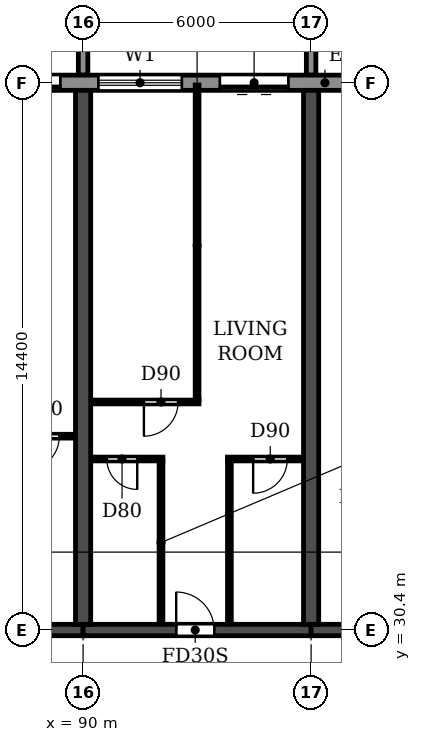
"""IFC4 building model, lengths in metres.
Left out: names, types, materials, properties, quantities, classifications, styles, units other than length and angle.
Written with IfcOpenShell. Run it as: python <this file> out.ifc"""

import sys

from ifc_helpers import new_model, si_unit, direction, frame, frame_2d, origin, place, context, subcontext, project, spatial, polyline, rectangle, outline, extrude, source, transform, mapped, element, fill, save


model = new_model("IFC4")
c1 = context("Model", 3, precision=1e-05, world=origin(), true_north=direction((0.0, 1.0)))
c2 = subcontext(c1, "Body", "Model", "MODEL_VIEW")
j1 = project(units=[si_unit("LENGTHUNIT", "METRE"), si_unit("PLANEANGLEUNIT", "RADIAN")], contexts=[c1])
p1 = place(None, origin())
s1 = spatial("IfcSite", under=j1, at=p1, CompositionType="ELEMENT")
p2 = place(p1, origin())
s2 = spatial("IfcBuilding", under=s1, at=p2, CompositionType="ELEMENT")
p3 = place(p2, frame((0.0, 0.0, 43.2)))
s3 = spatial("IfcBuildingStorey", under=s2, at=p3, CompositionType="ELEMENT", Elevation=43.2)
for number, where, z_axis, x_axis in (
    (1, (90.0, 30.55, 0.0), (0.0, 0.0, 1.0), (0.0, 1.0, 0.0)),
    (2, (96.0, 30.55, 0.0), (0.0, 0.0, 1.0), (0.0, 1.0, 0.0)),
):
    element("IfcWall", number, at=place(p3, frame(where, z_axis=z_axis, x_axis=x_axis)), inside=s3, PredefinedType="SHEAR", context=c2, shape_type="SweptSolid", body=[
        extrude(rectangle(XDim=14.05, YDim=0.4, at=frame_2d((7.025, 0.0))), origin(), (0.0, 0.0, 1.0), 3.05),
    ])
p4 = place(p3, frame((84.0, 30.4, 0.0), z_axis=(0.0, 0.0, 1.0), x_axis=(1.0, 0.0, 0.0)))
e3 = element("IfcWall", 3, at=p4, inside=s3, PredefinedType="SHEAR", context=c2, shape_type="SweptSolid", body=[
    extrude(rectangle(XDim=6.0, YDim=0.3, at=frame_2d((3.0, 0.0))), origin(), (0.0, 0.0, 1.0), 2.45),
])
p5 = place(p4, frame((2.45, 0.0, 0.0)))
e4 = element("IfcOpeningElement", 4, at=p5, cuts=e3, PredefinedType="OPENING", context=c2, shape_type="SweptSolid", body=[
    extrude(rectangle(XDim=1.0, YDim=2.1, at=frame_2d((0.5, 1.05))), frame((0.0, 0.16, 0.0), z_axis=(0.0, -1.0, 0.0), x_axis=(1.0, 0.0, 0.0)), (0.0, 0.0, 1.0), 0.32),
])
p6 = place(p3, frame((90.0, 30.4, 0.0), z_axis=(0.0, 0.0, 1.0), x_axis=(1.0, 0.0, 0.0)))
e5 = element("IfcWall", 5, at=p6, inside=s3, PredefinedType="SHEAR", context=c2, shape_type="SweptSolid", body=[
    extrude(rectangle(XDim=6.0, YDim=0.3, at=frame_2d((3.0, 0.0))), origin(), (0.0, 0.0, 1.0), 2.45),
])
p7 = place(p6, frame((2.45, 0.0, 0.0)))
e6 = element("IfcOpeningElement", 6, at=p7, cuts=e5, PredefinedType="OPENING", context=c2, shape_type="SweptSolid", body=[
    extrude(rectangle(XDim=1.0, YDim=2.1, at=frame_2d((0.5, 1.05))), frame((0.0, 0.16, 0.0), z_axis=(0.0, -1.0, 0.0), x_axis=(1.0, 0.0, 0.0)), (0.0, 0.0, 1.0), 0.32),
])
p8 = place(p3, frame((96.0, 30.4, 0.0), z_axis=(0.0, 0.0, 1.0), x_axis=(1.0, 0.0, 0.0)))
e7 = element("IfcWall", 7, at=p8, inside=s3, PredefinedType="SHEAR", context=c2, shape_type="SweptSolid", body=[
    extrude(rectangle(XDim=5.8, YDim=0.3, at=frame_2d((2.9, 0.0))), origin(), (0.0, 0.0, 1.0), 2.45),
])
p9 = place(p8, frame((2.5, 0.0, 0.0)))
e8 = element("IfcOpeningElement", 8, at=p9, cuts=e7, PredefinedType="OPENING", context=c2, shape_type="SweptSolid", body=[
    extrude(rectangle(XDim=1.0, YDim=2.1, at=frame_2d((0.5, 1.05))), frame((0.0, 0.16, 0.0), z_axis=(0.0, -1.0, 0.0), x_axis=(1.0, 0.0, 0.0)), (0.0, 0.0, 1.0), 0.32),
])
p10 = place(p3, frame((97.317, 44.8, 0.0), z_axis=(0.0, 0.0, 1.0), x_axis=(-1.0, 0.0, 0.0)))
e9 = element("IfcWall", 9, at=p10, inside=s3, PredefinedType="STANDARD", context=c2, shape_type="SweptSolid", body=[
    extrude(rectangle(XDim=92.634, YDim=0.4, at=frame_2d((46.317, 0.0))), origin(), (0.0, 0.0, 1.0), 3.05),
])
p11 = place(p10, frame((88.917, 0.0, 0.0)))
e10 = element("IfcOpeningElement", 10, at=p11, cuts=e9, PredefinedType="OPENING", context=c2, shape_type="SweptSolid", body=[
    extrude(rectangle(XDim=1.8, YDim=2.4, at=frame_2d((0.9, 1.2))), frame((0.0, 0.21, 0.0), z_axis=(0.0, -1.0, 0.0), x_axis=(1.0, 0.0, 0.0)), (0.0, 0.0, 1.0), 0.42),
])
p12 = place(p10, frame((85.717, 0.0, 0.9)))
e11 = element("IfcOpeningElement", 11, at=p12, cuts=e9, PredefinedType="OPENING", context=c2, shape_type="SweptSolid", body=[
    extrude(rectangle(XDim=2.2, YDim=1.5, at=frame_2d((1.1, 0.75))), frame((0.0, 0.21, 0.0), z_axis=(0.0, -1.0, 0.0), x_axis=(1.0, 0.0, 0.0)), (0.0, 0.0, 1.0), 0.42),
])
p13 = place(p10, frame((82.717, 0.0, 0.9)))
e12 = element("IfcOpeningElement", 12, at=p13, cuts=e9, PredefinedType="OPENING", context=c2, shape_type="SweptSolid", body=[
    extrude(rectangle(XDim=2.2, YDim=1.5, at=frame_2d((1.1, 0.75))), frame((0.0, 0.21, 0.0), z_axis=(0.0, -1.0, 0.0), x_axis=(1.0, 0.0, 0.0)), (0.0, 0.0, 1.0), 0.42),
])
p14 = place(p10, frame((79.717, 0.0, 0.9)))
e13 = element("IfcOpeningElement", 13, at=p14, cuts=e9, PredefinedType="OPENING", context=c2, shape_type="SweptSolid", body=[
    extrude(rectangle(XDim=2.2, YDim=1.5, at=frame_2d((1.1, 0.75))), frame((0.0, 0.21, 0.0), z_axis=(0.0, -1.0, 0.0), x_axis=(1.0, 0.0, 0.0)), (0.0, 0.0, 1.0), 0.42),
])
p15 = place(p10, frame((76.717, 0.0, 0.9)))
e14 = element("IfcOpeningElement", 14, at=p15, cuts=e9, PredefinedType="OPENING", context=c2, shape_type="SweptSolid", body=[
    extrude(rectangle(XDim=2.2, YDim=1.5, at=frame_2d((1.1, 0.75))), frame((0.0, 0.21, 0.0), z_axis=(0.0, -1.0, 0.0), x_axis=(1.0, 0.0, 0.0)), (0.0, 0.0, 1.0), 0.42),
])
p16 = place(p10, frame((73.917, 0.0, 0.0)))
e15 = element("IfcOpeningElement", 15, at=p16, cuts=e9, PredefinedType="OPENING", context=c2, shape_type="SweptSolid", body=[
    extrude(rectangle(XDim=1.8, YDim=2.4, at=frame_2d((0.9, 1.2))), frame((0.0, 0.21, 0.0), z_axis=(0.0, -1.0, 0.0), x_axis=(1.0, 0.0, 0.0)), (0.0, 0.0, 1.0), 0.42),
])
p17 = place(p10, frame((70.717, 0.0, 0.9)))
e16 = element("IfcOpeningElement", 16, at=p17, cuts=e9, PredefinedType="OPENING", context=c2, shape_type="SweptSolid", body=[
    extrude(rectangle(XDim=2.2, YDim=1.5, at=frame_2d((1.1, 0.75))), frame((0.0, 0.21, 0.0), z_axis=(0.0, -1.0, 0.0), x_axis=(1.0, 0.0, 0.0)), (0.0, 0.0, 1.0), 0.42),
])
p18 = place(p10, frame((67.717, 0.0, 0.9)))
e17 = element("IfcOpeningElement", 17, at=p18, cuts=e9, PredefinedType="OPENING", context=c2, shape_type="SweptSolid", body=[
    extrude(rectangle(XDim=2.2, YDim=1.5, at=frame_2d((1.1, 0.75))), frame((0.0, 0.21, 0.0), z_axis=(0.0, -1.0, 0.0), x_axis=(1.0, 0.0, 0.0)), (0.0, 0.0, 1.0), 0.42),
])
p19 = place(p10, frame((64.717, 0.0, 0.9)))
e18 = element("IfcOpeningElement", 18, at=p19, cuts=e9, PredefinedType="OPENING", context=c2, shape_type="SweptSolid", body=[
    extrude(rectangle(XDim=2.2, YDim=1.5, at=frame_2d((1.1, 0.75))), frame((0.0, 0.21, 0.0), z_axis=(0.0, -1.0, 0.0), x_axis=(1.0, 0.0, 0.0)), (0.0, 0.0, 1.0), 0.42),
])
p20 = place(p10, frame((61.917, 0.0, 0.0)))
e19 = element("IfcOpeningElement", 19, at=p20, cuts=e9, PredefinedType="OPENING", context=c2, shape_type="SweptSolid", body=[
    extrude(rectangle(XDim=1.8, YDim=2.4, at=frame_2d((0.9, 1.2))), frame((0.0, 0.21, 0.0), z_axis=(0.0, -1.0, 0.0), x_axis=(1.0, 0.0, 0.0)), (0.0, 0.0, 1.0), 0.42),
])
p21 = place(p10, frame((58.717, 0.0, 0.9)))
e20 = element("IfcOpeningElement", 20, at=p21, cuts=e9, PredefinedType="OPENING", context=c2, shape_type="SweptSolid", body=[
    extrude(rectangle(XDim=2.2, YDim=1.5, at=frame_2d((1.1, 0.75))), frame((0.0, 0.21, 0.0), z_axis=(0.0, -1.0, 0.0), x_axis=(1.0, 0.0, 0.0)), (0.0, 0.0, 1.0), 0.42),
])
p22 = place(p10, frame((55.717, 0.0, 0.9)))
e21 = element("IfcOpeningElement", 21, at=p22, cuts=e9, PredefinedType="OPENING", context=c2, shape_type="SweptSolid", body=[
    extrude(rectangle(XDim=2.2, YDim=1.5, at=frame_2d((1.1, 0.75))), frame((0.0, 0.21, 0.0), z_axis=(0.0, -1.0, 0.0), x_axis=(1.0, 0.0, 0.0)), (0.0, 0.0, 1.0), 0.42),
])
p23 = place(p10, frame((52.717, 0.0, 0.9)))
e22 = element("IfcOpeningElement", 22, at=p23, cuts=e9, PredefinedType="OPENING", context=c2, shape_type="SweptSolid", body=[
    extrude(rectangle(XDim=2.2, YDim=1.5, at=frame_2d((1.1, 0.75))), frame((0.0, 0.21, 0.0), z_axis=(0.0, -1.0, 0.0), x_axis=(1.0, 0.0, 0.0)), (0.0, 0.0, 1.0), 0.42),
])
p24 = place(p10, frame((49.917, 0.0, 0.0)))
e23 = element("IfcOpeningElement", 23, at=p24, cuts=e9, PredefinedType="OPENING", context=c2, shape_type="SweptSolid", body=[
    extrude(rectangle(XDim=1.8, YDim=2.4, at=frame_2d((0.9, 1.2))), frame((0.0, 0.21, 0.0), z_axis=(0.0, -1.0, 0.0), x_axis=(1.0, 0.0, 0.0)), (0.0, 0.0, 1.0), 0.42),
])
p25 = place(p10, frame((46.717, 0.0, 0.9)))
e24 = element("IfcOpeningElement", 24, at=p25, cuts=e9, PredefinedType="OPENING", context=c2, shape_type="SweptSolid", body=[
    extrude(rectangle(XDim=2.2, YDim=1.5, at=frame_2d((1.1, 0.75))), frame((0.0, 0.21, 0.0), z_axis=(0.0, -1.0, 0.0), x_axis=(1.0, 0.0, 0.0)), (0.0, 0.0, 1.0), 0.42),
])
p26 = place(p10, frame((43.717, 0.0, 0.9)))
e25 = element("IfcOpeningElement", 25, at=p26, cuts=e9, PredefinedType="OPENING", context=c2, shape_type="SweptSolid", body=[
    extrude(rectangle(XDim=2.2, YDim=1.5, at=frame_2d((1.1, 0.75))), frame((0.0, 0.21, 0.0), z_axis=(0.0, -1.0, 0.0), x_axis=(1.0, 0.0, 0.0)), (0.0, 0.0, 1.0), 0.42),
])
p27 = place(p10, frame((40.717, 0.0, 0.9)))
e26 = element("IfcOpeningElement", 26, at=p27, cuts=e9, PredefinedType="OPENING", context=c2, shape_type="SweptSolid", body=[
    extrude(rectangle(XDim=2.2, YDim=1.5, at=frame_2d((1.1, 0.75))), frame((0.0, 0.21, 0.0), z_axis=(0.0, -1.0, 0.0), x_axis=(1.0, 0.0, 0.0)), (0.0, 0.0, 1.0), 0.42),
])
p28 = place(p10, frame((37.917, 0.0, 0.0)))
e27 = element("IfcOpeningElement", 27, at=p28, cuts=e9, PredefinedType="OPENING", context=c2, shape_type="SweptSolid", body=[
    extrude(rectangle(XDim=1.8, YDim=2.4, at=frame_2d((0.9, 1.2))), frame((0.0, 0.21, 0.0), z_axis=(0.0, -1.0, 0.0), x_axis=(1.0, 0.0, 0.0)), (0.0, 0.0, 1.0), 0.42),
])
p29 = place(p10, frame((34.717, 0.0, 0.9)))
e28 = element("IfcOpeningElement", 28, at=p29, cuts=e9, PredefinedType="OPENING", context=c2, shape_type="SweptSolid", body=[
    extrude(rectangle(XDim=2.2, YDim=1.5, at=frame_2d((1.1, 0.75))), frame((0.0, 0.21, 0.0), z_axis=(0.0, -1.0, 0.0), x_axis=(1.0, 0.0, 0.0)), (0.0, 0.0, 1.0), 0.42),
])
p30 = place(p10, frame((31.717, 0.0, 0.9)))
e29 = element("IfcOpeningElement", 29, at=p30, cuts=e9, PredefinedType="OPENING", context=c2, shape_type="SweptSolid", body=[
    extrude(rectangle(XDim=2.2, YDim=1.5, at=frame_2d((1.1, 0.75))), frame((0.0, 0.21, 0.0), z_axis=(0.0, -1.0, 0.0), x_axis=(1.0, 0.0, 0.0)), (0.0, 0.0, 1.0), 0.42),
])
p31 = place(p10, frame((28.717, 0.0, 0.9)))
e30 = element("IfcOpeningElement", 30, at=p31, cuts=e9, PredefinedType="OPENING", context=c2, shape_type="SweptSolid", body=[
    extrude(rectangle(XDim=2.2, YDim=1.5, at=frame_2d((1.1, 0.75))), frame((0.0, 0.21, 0.0), z_axis=(0.0, -1.0, 0.0), x_axis=(1.0, 0.0, 0.0)), (0.0, 0.0, 1.0), 0.42),
])
p32 = place(p10, frame((25.917, 0.0, 0.0)))
e31 = element("IfcOpeningElement", 31, at=p32, cuts=e9, PredefinedType="OPENING", context=c2, shape_type="SweptSolid", body=[
    extrude(rectangle(XDim=1.8, YDim=2.4, at=frame_2d((0.9, 1.2))), frame((0.0, 0.21, 0.0), z_axis=(0.0, -1.0, 0.0), x_axis=(1.0, 0.0, 0.0)), (0.0, 0.0, 1.0), 0.42),
])
p33 = place(p10, frame((22.917, 0.0, 0.0)))
e32 = element("IfcOpeningElement", 32, at=p33, cuts=e9, PredefinedType="OPENING", context=c2, shape_type="SweptSolid", body=[
    extrude(rectangle(XDim=1.8, YDim=2.4, at=frame_2d((0.9, 1.2))), frame((0.0, 0.21, 0.0), z_axis=(0.0, -1.0, 0.0), x_axis=(1.0, 0.0, 0.0)), (0.0, 0.0, 1.0), 0.42),
])
p34 = place(p10, frame((19.717, 0.0, 0.9)))
e33 = element("IfcOpeningElement", 33, at=p34, cuts=e9, PredefinedType="OPENING", context=c2, shape_type="SweptSolid", body=[
    extrude(rectangle(XDim=2.2, YDim=1.5, at=frame_2d((1.1, 0.75))), frame((0.0, 0.21, 0.0), z_axis=(0.0, -1.0, 0.0), x_axis=(1.0, 0.0, 0.0)), (0.0, 0.0, 1.0), 0.42),
])
p35 = place(p10, frame((16.717, 0.0, 0.9)))
e34 = element("IfcOpeningElement", 34, at=p35, cuts=e9, PredefinedType="OPENING", context=c2, shape_type="SweptSolid", body=[
    extrude(rectangle(XDim=2.2, YDim=1.5, at=frame_2d((1.1, 0.75))), frame((0.0, 0.21, 0.0), z_axis=(0.0, -1.0, 0.0), x_axis=(1.0, 0.0, 0.0)), (0.0, 0.0, 1.0), 0.42),
])
p36 = place(p10, frame((13.717, 0.0, 0.9)))
e35 = element("IfcOpeningElement", 35, at=p36, cuts=e9, PredefinedType="OPENING", context=c2, shape_type="SweptSolid", body=[
    extrude(rectangle(XDim=2.2, YDim=1.5, at=frame_2d((1.1, 0.75))), frame((0.0, 0.21, 0.0), z_axis=(0.0, -1.0, 0.0), x_axis=(1.0, 0.0, 0.0)), (0.0, 0.0, 1.0), 0.42),
])
p37 = place(p10, frame((10.717, 0.0, 0.9)))
e36 = element("IfcOpeningElement", 36, at=p37, cuts=e9, PredefinedType="OPENING", context=c2, shape_type="SweptSolid", body=[
    extrude(rectangle(XDim=2.2, YDim=1.5, at=frame_2d((1.1, 0.75))), frame((0.0, 0.21, 0.0), z_axis=(0.0, -1.0, 0.0), x_axis=(1.0, 0.0, 0.0)), (0.0, 0.0, 1.0), 0.42),
])
p38 = place(p10, frame((7.917, 0.0, 0.0)))
e37 = element("IfcOpeningElement", 37, at=p38, cuts=e9, PredefinedType="OPENING", context=c2, shape_type="SweptSolid", body=[
    extrude(rectangle(XDim=1.8, YDim=2.4, at=frame_2d((0.9, 1.2))), frame((0.0, 0.21, 0.0), z_axis=(0.0, -1.0, 0.0), x_axis=(1.0, 0.0, 0.0)), (0.0, 0.0, 1.0), 0.42),
])
p39 = place(p10, frame((4.717, 0.0, 0.9)))
e38 = element("IfcOpeningElement", 38, at=p39, cuts=e9, PredefinedType="OPENING", context=c2, shape_type="SweptSolid", body=[
    extrude(rectangle(XDim=2.2, YDim=1.5, at=frame_2d((1.1, 0.75))), frame((0.0, 0.21, 0.0), z_axis=(0.0, -1.0, 0.0), x_axis=(1.0, 0.0, 0.0)), (0.0, 0.0, 1.0), 0.42),
])
p40 = place(p10, frame((1.917, 0.0, 0.0)))
e39 = element("IfcOpeningElement", 39, at=p40, cuts=e9, PredefinedType="OPENING", context=c2, shape_type="SweptSolid", body=[
    extrude(rectangle(XDim=1.8, YDim=2.4, at=frame_2d((0.9, 1.2))), frame((0.0, 0.21, 0.0), z_axis=(0.0, -1.0, 0.0), x_axis=(1.0, 0.0, 0.0)), (0.0, 0.0, 1.0), 0.42),
])
m1 = source(origin(), c2, "Body", "SweptSolid", [
    extrude(outline(polyline([(0.0, 0.0), (0.25, 0.0), (0.25, 3.1), (0.0, 3.1), (0.0, 0.0)])), origin(), (0.0, 0.0, 1.0), 3.1),
])
for number, where in (
    (40, (89.875, 45.0, 0.0)),
    (41, (95.875, 45.0, 0.0)),
):
    element("IfcWall", number, at=place(p3, frame(where)), inside=s3, PredefinedType="STANDARD", context=c2, shape_type="MappedRepresentation", body=[
        mapped(m1, transform((0.0, 0.0, 0.0))),
    ])
p41 = place(p3, frame((90.21, 34.9, 0.0), z_axis=(0.0, 0.0, 1.0), x_axis=(1.0, 0.0, 0.0)))
e42 = element("IfcWall", 42, at=p41, inside=s3, PredefinedType="PARTITIONING", context=c2, shape_type="SweptSolid", body=[
    extrude(rectangle(XDim=1.89, YDim=0.1, at=frame_2d((0.945, 0.0))), origin(), (0.0, 0.0, 1.0), 3.05),
])
p42 = place(p41, frame((0.415, 0.0, 0.0)))
e43 = element("IfcOpeningElement", 43, at=p42, cuts=e42, PredefinedType="OPENING", context=c2, shape_type="SweptSolid", body=[
    extrude(rectangle(XDim=0.8, YDim=2.1, at=frame_2d((0.4, 1.05))), frame((0.0, 0.06, 0.0), z_axis=(0.0, -1.0, 0.0), x_axis=(1.0, 0.0, 0.0)), (0.0, 0.0, 1.0), 0.12),
])
p43 = place(p3, frame((93.8, 34.9, 0.0), z_axis=(0.0, 0.0, 1.0), x_axis=(1.0, 0.0, 0.0)))
e44 = element("IfcWall", 44, at=p43, inside=s3, PredefinedType="PARTITIONING", context=c2, shape_type="SweptSolid", body=[
    extrude(rectangle(XDim=1.99, YDim=0.1, at=frame_2d((0.995, 0.0))), origin(), (0.0, 0.0, 1.0), 3.05),
])
p44 = place(p43, frame((0.675, 0.0, 0.0)))
e45 = element("IfcOpeningElement", 45, at=p44, cuts=e44, PredefinedType="OPENING", context=c2, shape_type="SweptSolid", body=[
    extrude(rectangle(XDim=0.9, YDim=2.1, at=frame_2d((0.45, 1.05))), frame((0.0, 0.06, 0.0), z_axis=(0.0, -1.0, 0.0), x_axis=(1.0, 0.0, 0.0)), (0.0, 0.0, 1.0), 0.12),
])
p45 = place(p3, frame((87.8, 35.5, 0.0), z_axis=(0.0, 0.0, 1.0), x_axis=(1.0, 0.0, 0.0)))
e46 = element("IfcWall", 46, at=p45, inside=s3, PredefinedType="PARTITIONING", context=c2, shape_type="SweptSolid", body=[
    extrude(rectangle(XDim=1.99, YDim=0.1, at=frame_2d((0.995, 0.0))), origin(), (0.0, 0.0, 1.0), 3.05),
])
p46 = place(p45, frame((0.675, 0.0, 0.0)))
e47 = element("IfcOpeningElement", 47, at=p46, cuts=e46, PredefinedType="OPENING", context=c2, shape_type="SweptSolid", body=[
    extrude(rectangle(XDim=0.9, YDim=2.1, at=frame_2d((0.45, 1.05))), frame((0.0, 0.06, 0.0), z_axis=(0.0, -1.0, 0.0), x_axis=(1.0, 0.0, 0.0)), (0.0, 0.0, 1.0), 0.12),
])
p47 = place(p3, frame((90.21, 36.4, 0.0), z_axis=(0.0, 0.0, 1.0), x_axis=(1.0, 0.0, 0.0)))
e48 = element("IfcWall", 48, at=p47, inside=s3, PredefinedType="PARTITIONING", context=c2, shape_type="SweptSolid", body=[
    extrude(rectangle(XDim=2.84, YDim=0.1, at=frame_2d((1.42, 0.0))), origin(), (0.0, 0.0, 1.0), 3.05),
])
p48 = place(p47, frame((1.39, 0.0, 0.0)))
e49 = element("IfcOpeningElement", 49, at=p48, cuts=e48, PredefinedType="OPENING", context=c2, shape_type="SweptSolid", body=[
    extrude(rectangle(XDim=0.9, YDim=2.1, at=frame_2d((0.45, 1.05))), frame((0.0, 0.06, 0.0), z_axis=(0.0, -1.0, 0.0), x_axis=(1.0, 0.0, 0.0)), (0.0, 0.0, 1.0), 0.12),
])
p49 = place(p3, frame((92.05, 30.56, 0.0), z_axis=(0.0, 0.0, 1.0), x_axis=(0.0, 1.0, 0.0)))
e50 = element("IfcWall", 50, at=p49, inside=s3, PredefinedType="PARTITIONING", context=c2, shape_type="SweptSolid", body=[
    extrude(rectangle(XDim=4.29, YDim=0.1, at=frame_2d((2.145, 0.0))), origin(), (0.0, 0.0, 1.0), 3.05),
])
p50 = place(p3, frame((93.0, 36.45, 0.0), z_axis=(0.0, 0.0, 1.0), x_axis=(0.0, 1.0, 0.0)))
e51 = element("IfcWall", 51, at=p50, inside=s3, PredefinedType="PARTITIONING", context=c2, shape_type="SweptSolid", body=[
    extrude(rectangle(XDim=8.29, YDim=0.1, at=frame_2d((4.145, 0.0))), origin(), (0.0, 0.0, 1.0), 3.05),
])
p51 = place(p3, frame((93.85, 30.56, 0.0), z_axis=(0.0, 0.0, 1.0), x_axis=(0.0, 1.0, 0.0)))
e52 = element("IfcWall", 52, at=p51, inside=s3, PredefinedType="PARTITIONING", context=c2, shape_type="SweptSolid", body=[
    extrude(rectangle(XDim=4.29, YDim=0.1, at=frame_2d((2.145, 0.0))), origin(), (0.0, 0.0, 1.0), 3.05),
])
p52 = place(p38, origin())
e53 = element("IfcDoor", 53, at=p52, inside=s3, OperationType="DOUBLE_DOOR_SLIDING", PredefinedType="DOOR", context=c2, shape_type="SweptSolid", body=[
    extrude(rectangle(XDim=1.8, YDim=2.4, at=frame_2d((0.9, 1.2))), frame((0.0, 0.025, 0.0), z_axis=(0.0, -1.0, 0.0), x_axis=(1.0, 0.0, 0.0)), (0.0, 0.0, 1.0), 0.05),
])
fill(e37, e53)
p53 = place(p39, origin())
e54 = element("IfcWindow", 54, at=p53, inside=s3, PartitioningType="DOUBLE_PANEL_HORIZONTAL", PredefinedType="WINDOW", context=c2, shape_type="SweptSolid", body=[
    extrude(rectangle(XDim=2.2, YDim=1.5, at=frame_2d((1.1, 0.75))), frame((0.0, 0.03, 0.0), z_axis=(0.0, -1.0, 0.0), x_axis=(1.0, 0.0, 0.0)), (0.0, 0.0, 1.0), 0.06),
])
fill(e38, e54)
p54 = place(p40, origin())
e55 = element("IfcDoor", 55, at=p54, inside=s3, OperationType="DOUBLE_DOOR_SLIDING", PredefinedType="DOOR", context=c2, shape_type="SweptSolid", body=[
    extrude(rectangle(XDim=1.8, YDim=2.4, at=frame_2d((0.9, 1.2))), frame((0.0, 0.025, 0.0), z_axis=(0.0, -1.0, 0.0), x_axis=(1.0, 0.0, 0.0)), (0.0, 0.0, 1.0), 0.05),
])
fill(e39, e55)
p55 = place(p46, frame((0.9, 0.0, 0.0), z_axis=(0.0, 0.0, 1.0), x_axis=(-1.0, 0.0, 0.0)))
e56 = element("IfcDoor", 56, at=p55, inside=s3, OperationType="SINGLE_SWING_RIGHT", PredefinedType="DOOR", context=c2, shape_type="SweptSolid", body=[
    extrude(rectangle(XDim=0.9, YDim=2.1, at=frame_2d((0.45, 1.05))), frame((0.0, 0.025, 0.0), z_axis=(0.0, -1.0, 0.0), x_axis=(1.0, 0.0, 0.0)), (0.0, 0.0, 1.0), 0.05),
])
fill(e47, e56)
p56 = place(p42, frame((0.8, 0.0, 0.0), z_axis=(0.0, 0.0, 1.0), x_axis=(-1.0, 0.0, 0.0)))
e57 = element("IfcDoor", 57, at=p56, inside=s3, OperationType="SINGLE_SWING_LEFT", PredefinedType="DOOR", context=c2, shape_type="SweptSolid", body=[
    extrude(rectangle(XDim=0.8, YDim=2.1, at=frame_2d((0.4, 1.05))), frame((0.0, 0.025, 0.0), z_axis=(0.0, -1.0, 0.0), x_axis=(1.0, 0.0, 0.0)), (0.0, 0.0, 1.0), 0.05),
])
fill(e43, e57)
p57 = place(p48, frame((0.9, 0.0, 0.0), z_axis=(0.0, 0.0, 1.0), x_axis=(-1.0, 0.0, 0.0)))
e58 = element("IfcDoor", 58, at=p57, inside=s3, OperationType="SINGLE_SWING_RIGHT", PredefinedType="DOOR", context=c2, shape_type="SweptSolid", body=[
    extrude(rectangle(XDim=0.9, YDim=2.1, at=frame_2d((0.45, 1.05))), frame((0.0, 0.025, 0.0), z_axis=(0.0, -1.0, 0.0), x_axis=(1.0, 0.0, 0.0)), (0.0, 0.0, 1.0), 0.05),
])
fill(e49, e58)
p58 = place(p7, origin())
e59 = element("IfcDoor", 59, at=p58, inside=s3, OperationType="SINGLE_SWING_LEFT", PredefinedType="DOOR", context=c2, shape_type="SweptSolid", body=[
    extrude(rectangle(XDim=1.0, YDim=2.1, at=frame_2d((0.5, 1.05))), frame((0.0, 0.025, 0.0), z_axis=(0.0, -1.0, 0.0), x_axis=(1.0, 0.0, 0.0)), (0.0, 0.0, 1.0), 0.05),
])
fill(e6, e59)
p59 = place(p44, frame((0.9, 0.0, 0.0), z_axis=(0.0, 0.0, 1.0), x_axis=(-1.0, 0.0, 0.0)))
e60 = element("IfcDoor", 60, at=p59, inside=s3, OperationType="SINGLE_SWING_RIGHT", PredefinedType="DOOR", context=c2, shape_type="SweptSolid", body=[
    extrude(rectangle(XDim=0.9, YDim=2.1, at=frame_2d((0.45, 1.05))), frame((0.0, 0.025, 0.0), z_axis=(0.0, -1.0, 0.0), x_axis=(1.0, 0.0, 0.0)), (0.0, 0.0, 1.0), 0.05),
])
fill(e45, e60)
save(model, sys.argv[1])
